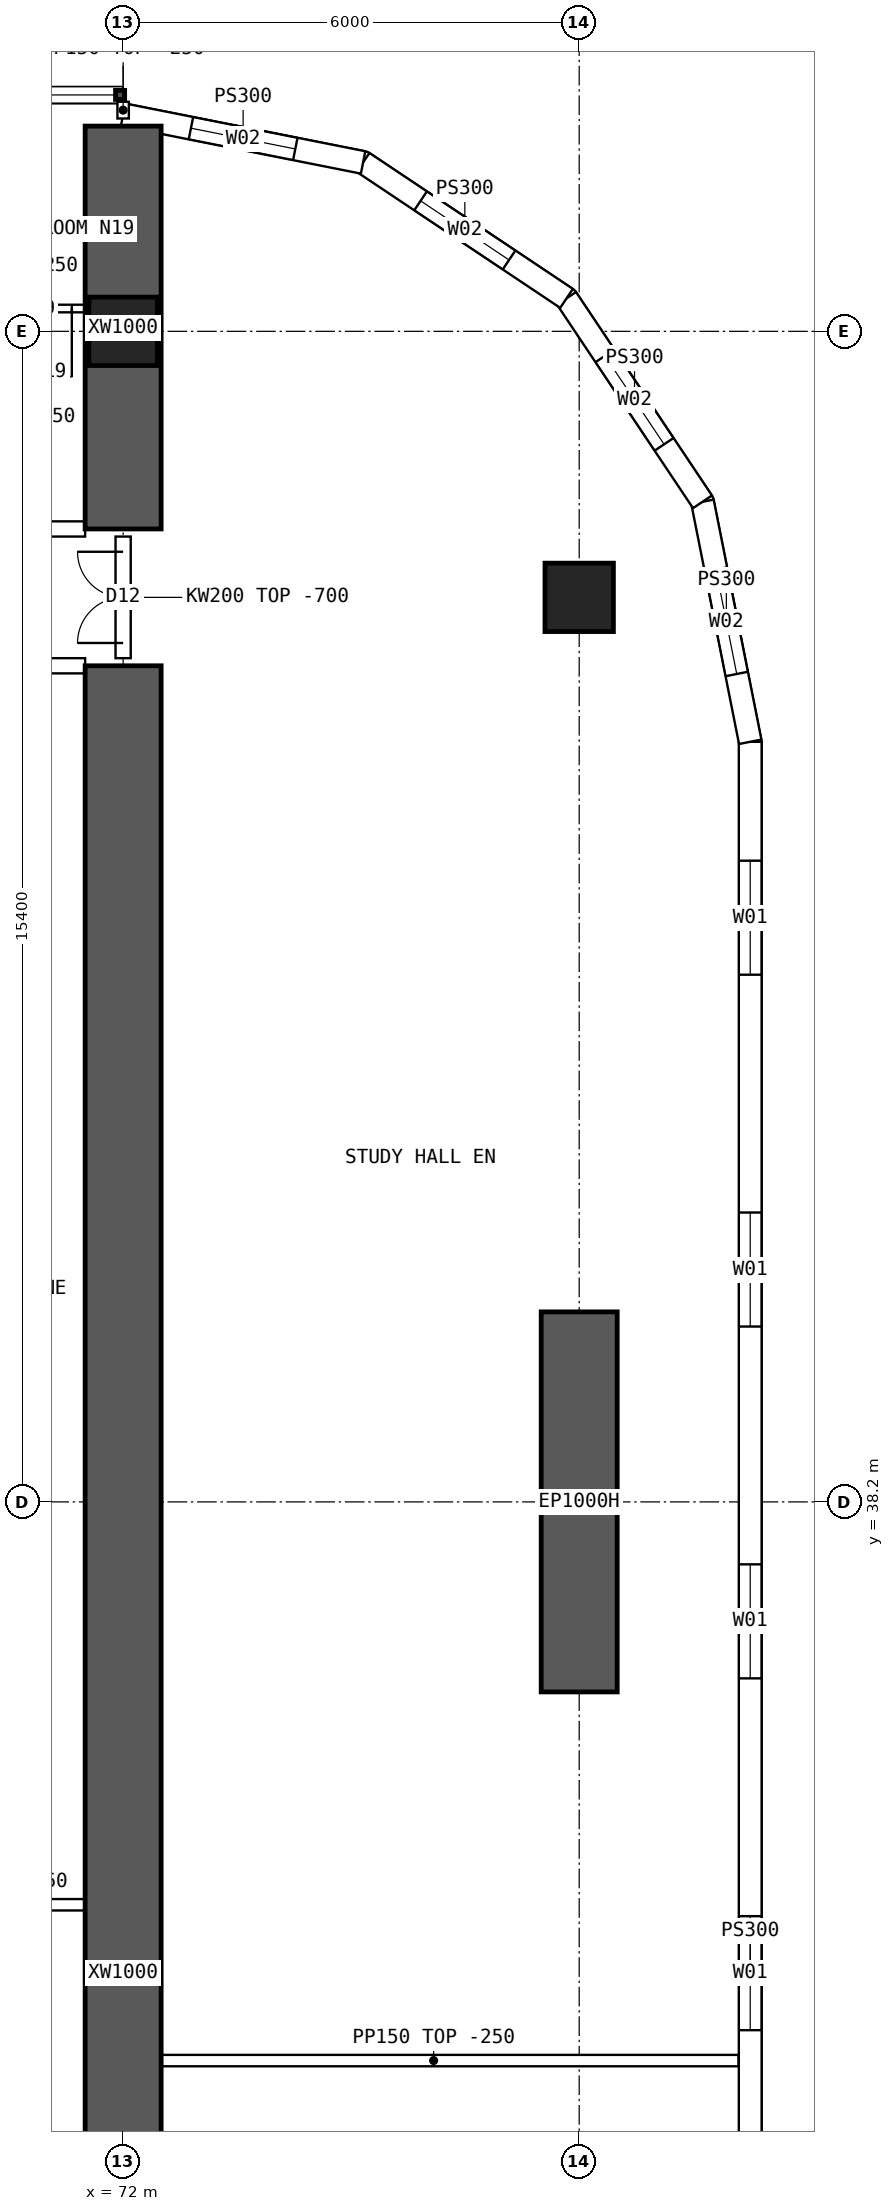
"""IFC4 building model, lengths in metres.
Left out: names, types, materials, properties, quantities, classifications, styles, units other than length and angle.
Written with IfcOpenShell. Run it as: python <this file> out.ifc"""

import sys

from ifc_helpers import new_model, si_unit, direction, frame, frame_2d, origin, origin_2d, place, context, subcontext, project, spatial, polyline, rectangle, hollow_rectangle, outline, extrude, element, fill, save


model = new_model("IFC4")
c1 = context("Model", 3, precision=1e-05, world=origin(), true_north=direction((0.0, 1.0)))
c2 = subcontext(c1, "Body", "Model", "MODEL_VIEW")
j1 = project(units=[si_unit("LENGTHUNIT", "METRE"), si_unit("PLANEANGLEUNIT", "RADIAN")], contexts=[c1])
p1 = place(None, origin())
s1 = spatial("IfcSite", under=j1, at=p1, CompositionType="ELEMENT")
p2 = place(p1, origin())
s2 = spatial("IfcBuilding", under=s1, at=p2, CompositionType="ELEMENT")
p3 = place(p2, frame((0.0, 0.0, 46.45)))
s3 = spatial("IfcBuildingStorey", under=s2, at=p3, CompositionType="ELEMENT", Elevation=46.45)
for number, where, z_axis, x_axis in (
    (1, (72.0, 53.6, 0.0), (0.0, 0.0, 1.0), (1.0, 0.0, 0.0)),
    (2, (78.0, 50.1, 0.0), (0.0, 0.0, 1.0), (1.0, 0.0, 0.0)),
):
    element("IfcColumn", number, at=place(p3, frame(where, z_axis=z_axis, x_axis=x_axis)), inside=s3, PredefinedType="COLUMN", context=c2, shape_type="SweptSolid", body=[
        extrude(hollow_rectangle(XDim=0.9, YDim=0.9, WallThickness=0.09, at=origin_2d()), origin(), (0.0, 0.0, 1.0), 3.75),
    ])
p4 = place(p3, frame((78.0, 35.7, 0.0), z_axis=(0.0, 0.0, 1.0), x_axis=(0.0, 1.0, 0.0)))
e3 = element("IfcWall", 3, at=p4, inside=s3, PredefinedType="SHEAR", context=c2, shape_type="SweptSolid", body=[
    extrude(rectangle(XDim=5.0, YDim=1.0, at=frame_2d((2.5, 0.0))), origin(), (0.0, 0.0, 1.0), 3.75),
])
p5 = place(p3, frame((72.0, 51.0, 0.0), z_axis=(0.0, 0.0, 1.0), x_axis=(0.0, 1.0, 0.0)))
e4 = element("IfcWall", 4, at=p5, inside=s3, PredefinedType="SHEAR", context=c2, shape_type="SweptSolid", body=[
    extrude(rectangle(XDim=5.3, YDim=1.0, at=frame_2d((2.65, 0.0))), origin(), (0.0, 0.0, 1.0), 3.75),
])
p6 = place(p3, frame((72.0, 14.8, 0.0), z_axis=(0.0, 0.0, 1.0), x_axis=(0.0, 1.0, 0.0)))
e5 = element("IfcWall", 5, at=p6, inside=s3, PredefinedType="SHEAR", context=c2, shape_type="SweptSolid", body=[
    extrude(rectangle(XDim=34.4, YDim=1.0, at=frame_2d((17.2, 0.0))), origin(), (0.0, 0.0, 1.0), 3.75),
])
p7 = place(p3, frame((80.25, 15.8, 0.0), z_axis=(0.0, 0.0, 1.0), x_axis=(0.0, 1.0, 0.0)))
e6 = element("IfcWall", 6, at=p7, inside=s3, PredefinedType="SOLIDWALL", context=c2, shape_type="SweptSolid", body=[
    extrude(outline(polyline([(-0.015, -0.15), (32.415, -0.15), (32.385, 0.15), (0.015, 0.15), (-0.015, -0.15)])), origin(), (0.0, 0.0, 1.0), 3.5),
])
p8 = place(p7, frame((1.564, 0.0, 0.9)))
e7 = element("IfcOpeningElement", 7, at=p8, cuts=e6, PredefinedType="OPENING", context=c2, shape_type="SweptSolid", body=[
    extrude(rectangle(XDim=1.5, YDim=2.0, at=frame_2d((0.75, 1.0))), frame((0.0, 0.16, 0.0), z_axis=(0.0, -1.0, 0.0), x_axis=(1.0, 0.0, 0.0)), (0.0, 0.0, 1.0), 0.32),
])
p9 = place(p7, frame((6.193, 0.0, 0.9)))
e8 = element("IfcOpeningElement", 8, at=p9, cuts=e6, PredefinedType="OPENING", context=c2, shape_type="SweptSolid", body=[
    extrude(rectangle(XDim=1.5, YDim=2.0, at=frame_2d((0.75, 1.0))), frame((0.0, 0.16, 0.0), z_axis=(0.0, -1.0, 0.0), x_axis=(1.0, 0.0, 0.0)), (0.0, 0.0, 1.0), 0.32),
])
p10 = place(p7, frame((10.822, 0.0, 0.9)))
e9 = element("IfcOpeningElement", 9, at=p10, cuts=e6, PredefinedType="OPENING", context=c2, shape_type="SweptSolid", body=[
    extrude(rectangle(XDim=1.5, YDim=2.0, at=frame_2d((0.75, 1.0))), frame((0.0, 0.16, 0.0), z_axis=(0.0, -1.0, 0.0), x_axis=(1.0, 0.0, 0.0)), (0.0, 0.0, 1.0), 0.32),
])
p11 = place(p7, frame((15.45, 0.0, 0.9)))
e10 = element("IfcOpeningElement", 10, at=p11, cuts=e6, PredefinedType="OPENING", context=c2, shape_type="SweptSolid", body=[
    extrude(rectangle(XDim=1.5, YDim=2.0, at=frame_2d((0.75, 1.0))), frame((0.0, 0.16, 0.0), z_axis=(0.0, -1.0, 0.0), x_axis=(1.0, 0.0, 0.0)), (0.0, 0.0, 1.0), 0.32),
])
p12 = place(p7, frame((20.079, 0.0, 0.9)))
e11 = element("IfcOpeningElement", 11, at=p12, cuts=e6, PredefinedType="OPENING", context=c2, shape_type="SweptSolid", body=[
    extrude(rectangle(XDim=1.5, YDim=2.0, at=frame_2d((0.75, 1.0))), frame((0.0, 0.16, 0.0), z_axis=(0.0, -1.0, 0.0), x_axis=(1.0, 0.0, 0.0)), (0.0, 0.0, 1.0), 0.32),
])
p13 = place(p7, frame((24.707, 0.0, 0.9)))
e12 = element("IfcOpeningElement", 12, at=p13, cuts=e6, PredefinedType="OPENING", context=c2, shape_type="SweptSolid", body=[
    extrude(rectangle(XDim=1.5, YDim=2.0, at=frame_2d((0.75, 1.0))), frame((0.0, 0.16, 0.0), z_axis=(0.0, -1.0, 0.0), x_axis=(1.0, 0.0, 0.0)), (0.0, 0.0, 1.0), 0.32),
])
p14 = place(p7, frame((29.336, 0.0, 0.9)))
e13 = element("IfcOpeningElement", 13, at=p14, cuts=e6, PredefinedType="OPENING", context=c2, shape_type="SweptSolid", body=[
    extrude(rectangle(XDim=1.5, YDim=2.0, at=frame_2d((0.75, 1.0))), frame((0.0, 0.16, 0.0), z_axis=(0.0, -1.0, 0.0), x_axis=(1.0, 0.0, 0.0)), (0.0, 0.0, 1.0), 0.32),
])
p15 = place(p3, frame((80.25, 48.2, 0.0), z_axis=(0.0, 0.0, 1.0), x_axis=(-0.195065901187, 0.980790137692, 0.0)))
e14 = element("IfcWall", 14, at=p15, inside=s3, PredefinedType="SOLIDWALL", context=c2, shape_type="SweptSolid", body=[
    extrude(outline(polyline([(-0.015, -0.15), (3.249, -0.15), (3.189, 0.15), (0.015, 0.15), (-0.015, -0.15)])), origin(), (0.0, 0.0, 1.0), 3.5),
])
p16 = place(p15, frame((0.909, 0.0, 0.9)))
e15 = element("IfcOpeningElement", 15, at=p16, cuts=e14, PredefinedType="OPENING", context=c2, shape_type="SweptSolid", body=[
    extrude(rectangle(XDim=1.4, YDim=1.8, at=frame_2d((0.7, 0.9))), frame((0.0, 0.16, 0.0), z_axis=(0.0, -1.0, 0.0), x_axis=(1.0, 0.0, 0.0)), (0.0, 0.0, 1.0), 0.32),
])
p17 = place(p3, frame((79.622, 51.357, 0.0), z_axis=(0.0, 0.0, 1.0), x_axis=(-0.555609954424, 0.831443069936, 0.0)))
e16 = element("IfcWall", 16, at=p17, inside=s3, PredefinedType="SOLIDWALL", context=c2, shape_type="SweptSolid", body=[
    extrude(outline(polyline([(-0.03, -0.15), (3.249, -0.15), (3.189, 0.15), (0.03, 0.15), (-0.03, -0.15)])), origin(), (0.0, 0.0, 1.0), 3.5),
])
p18 = place(p17, frame((0.909, 0.0, 0.9)))
e17 = element("IfcOpeningElement", 17, at=p18, cuts=e16, PredefinedType="OPENING", context=c2, shape_type="SweptSolid", body=[
    extrude(rectangle(XDim=1.4, YDim=1.8, at=frame_2d((0.7, 0.9))), frame((0.0, 0.16, 0.0), z_axis=(0.0, -1.0, 0.0), x_axis=(1.0, 0.0, 0.0)), (0.0, 0.0, 1.0), 0.32),
])
p19 = place(p3, frame((77.833, 54.034, 0.0), z_axis=(0.0, 0.0, 1.0), x_axis=(-0.831478105043, 0.555557522525, 0.0)))
e18 = element("IfcWall", 18, at=p19, inside=s3, PredefinedType="SOLIDWALL", context=c2, shape_type="SweptSolid", body=[
    extrude(outline(polyline([(-0.03, -0.15), (3.249, -0.15), (3.189, 0.15), (0.03, 0.15), (-0.03, -0.15)])), origin(), (0.0, 0.0, 1.0), 3.5),
])
p20 = place(p19, frame((0.909, 0.0, 0.9)))
e19 = element("IfcOpeningElement", 19, at=p20, cuts=e18, PredefinedType="OPENING", context=c2, shape_type="SweptSolid", body=[
    extrude(rectangle(XDim=1.4, YDim=1.8, at=frame_2d((0.7, 0.9))), frame((0.0, 0.16, 0.0), z_axis=(0.0, -1.0, 0.0), x_axis=(1.0, 0.0, 0.0)), (0.0, 0.0, 1.0), 0.32),
])
p21 = place(p3, frame((75.157, 55.822, 0.0), z_axis=(0.0, 0.0, 1.0), x_axis=(-0.980787251524, 0.195080412259, 0.0)))
e20 = element("IfcWall", 20, at=p21, inside=s3, PredefinedType="SOLIDWALL", context=c2, shape_type="SweptSolid", body=[
    extrude(outline(polyline([(-0.03, -0.15), (3.249, -0.15), (3.189, 0.15), (0.03, 0.15), (-0.03, -0.15)])), origin(), (0.0, 0.0, 1.0), 3.5),
])
p22 = place(p21, frame((0.909, 0.0, 0.9)))
e21 = element("IfcOpeningElement", 21, at=p22, cuts=e20, PredefinedType="OPENING", context=c2, shape_type="SweptSolid", body=[
    extrude(rectangle(XDim=1.4, YDim=1.8, at=frame_2d((0.7, 0.9))), frame((0.0, 0.16, 0.0), z_axis=(0.0, -1.0, 0.0), x_axis=(1.0, 0.0, 0.0)), (0.0, 0.0, 1.0), 0.32),
])
p23 = place(p3, frame((66.5, 51.0, 0.0), z_axis=(0.0, 0.0, 1.0), x_axis=(1.0, 0.0, 0.0)))
e22 = element("IfcWall", 22, at=p23, inside=s3, PredefinedType="SOLIDWALL", context=c2, shape_type="SweptSolid", body=[
    extrude(outline(polyline([(0.0, 0.0), (5.0, 0.0), (5.0, 3.1), (0.0, 3.1), (0.0, 0.0)])), frame((0.0, 0.1, 0.0), z_axis=(0.0, -1.0, 0.0), x_axis=(1.0, 0.0, 0.0)), (0.0, 0.0, 1.0), 0.2),
])
p24 = place(p23, frame((1.3, 0.0, 0.0)))
e23 = element("IfcOpeningElement", 23, at=p24, cuts=e22, PredefinedType="OPENING", context=c2, shape_type="SweptSolid", body=[
    extrude(rectangle(XDim=0.9, YDim=2.1, at=frame_2d((0.45, 1.05))), frame((0.0, 0.11, 0.0), z_axis=(0.0, -1.0, 0.0), x_axis=(1.0, 0.0, 0.0)), (0.0, 0.0, 1.0), 0.22),
])
p25 = place(p23, frame((2.675, 0.0, 0.0)))
e24 = element("IfcOpeningElement", 24, at=p25, cuts=e22, PredefinedType="OPENING", context=c2, shape_type="SweptSolid", body=[
    extrude(rectangle(XDim=0.9, YDim=2.1, at=frame_2d((0.45, 1.05))), frame((0.0, 0.11, 0.0), z_axis=(0.0, -1.0, 0.0), x_axis=(1.0, 0.0, 0.0)), (0.0, 0.0, 1.0), 0.22),
])
p26 = place(p3, frame((66.5, 49.2, 0.0), z_axis=(0.0, 0.0, 1.0), x_axis=(1.0, 0.0, 0.0)))
e25 = element("IfcWall", 25, at=p26, inside=s3, PredefinedType="SOLIDWALL", context=c2, shape_type="SweptSolid", body=[
    extrude(rectangle(XDim=5.0, YDim=0.2, at=frame_2d((2.5, 0.0))), origin(), (0.0, 0.0, 1.0), 3.5),
])
p27 = place(p26, frame((0.2, 0.0, 0.0)))
e26 = element("IfcOpeningElement", 26, at=p27, cuts=e25, PredefinedType="OPENING", context=c2, shape_type="SweptSolid", body=[
    extrude(rectangle(XDim=1.6, YDim=2.1, at=frame_2d((0.8, 1.05))), frame((0.0, 0.11, 0.0), z_axis=(0.0, -1.0, 0.0), x_axis=(1.0, 0.0, 0.0)), (0.0, 0.0, 1.0), 0.22),
])
p28 = place(p3, frame((70.25, 53.9, 0.0), z_axis=(0.0, 0.0, 1.0), x_axis=(1.0, 0.0, 0.0)))
e27 = element("IfcWall", 27, at=p28, inside=s3, PredefinedType="PARTITIONING", context=c2, shape_type="SweptSolid", body=[
    extrude(rectangle(XDim=1.3, YDim=0.1, at=frame_2d((0.65, 0.0))), origin(), (0.0, 0.0, 1.0), 3.5),
])
p29 = place(p28, frame((0.175, 0.0, 0.0)))
e28 = element("IfcOpeningElement", 28, at=p29, cuts=e27, PredefinedType="OPENING", context=c2, shape_type="SweptSolid", body=[
    extrude(rectangle(XDim=0.9, YDim=2.1, at=frame_2d((0.45, 1.05))), frame((0.0, 0.06, 0.0), z_axis=(0.0, -1.0, 0.0), x_axis=(1.0, 0.0, 0.0)), (0.0, 0.0, 1.0), 0.12),
])
p30 = place(p3, frame((68.4, 32.9, 0.0), z_axis=(0.0, 0.0, 1.0), x_axis=(1.0, 0.0, 0.0)))
e29 = element("IfcWall", 29, at=p30, inside=s3, PredefinedType="PARTITIONING", context=c2, shape_type="SweptSolid", body=[
    extrude(rectangle(XDim=3.6, YDim=0.15, at=frame_2d((1.8, 0.0))), origin(), (0.0, 0.0, 1.0), 3.5),
])
p31 = place(p3, frame((72.075, 30.85, 0.0), z_axis=(0.0, 0.0, 1.0), x_axis=(1.0, 0.0, 0.0)))
e30 = element("IfcWall", 30, at=p31, inside=s3, PredefinedType="PARTITIONING", context=c2, shape_type="SweptSolid", body=[
    extrude(outline(polyline([(0.0, 0.0), (8.02, 0.0), (8.02, 3.5), (6.227, 3.5), (6.225, 3.05), (5.627, 3.05), (5.625, 3.5), (0.0, 3.5), (0.0, 0.0)])), frame((0.0, 0.075, 0.0), z_axis=(0.0, -1.0, 0.0), x_axis=(1.0, 0.0, 0.0)), (0.0, 0.0, 1.0), 0.15),
])
p32 = place(p3, frame((72.0, 49.3, 0.0), z_axis=(0.0, 0.0, 1.0), x_axis=(0.0, 1.0, 0.0)))
e31 = element("IfcWall", 31, at=p32, inside=s3, PredefinedType="SOLIDWALL", context=c2, shape_type="SweptSolid", body=[
    extrude(outline(polyline([(0.0, 0.0), (1.6, 0.0), (1.6, 3.05), (0.0, 3.05), (0.0, 0.0)])), frame((0.0, 0.1, 0.0), z_axis=(0.0, -1.0, 0.0), x_axis=(1.0, 0.0, 0.0)), (0.0, 0.0, 1.0), 0.2),
])
p33 = place(p32, frame((0.2, 0.0, 0.0)))
e32 = element("IfcOpeningElement", 32, at=p33, cuts=e31, PredefinedType="OPENING", context=c2, shape_type="SweptSolid", body=[
    extrude(rectangle(XDim=1.2, YDim=2.1, at=frame_2d((0.6, 1.05))), frame((0.0, 0.11, 0.0), z_axis=(0.0, -1.0, 0.0), x_axis=(1.0, 0.0, 0.0)), (0.0, 0.0, 1.0), 0.22),
])
p34 = place(p3, frame((72.0, 56.4, 0.0), z_axis=(0.0, 0.0, 1.0), x_axis=(0.0, 1.0, 0.0)))
e33 = element("IfcWall", 33, at=p34, inside=s3, PredefinedType="PARTITIONING", context=c2, shape_type="SweptSolid", body=[
    extrude(rectangle(XDim=0.22, YDim=0.15, at=frame_2d((0.11, 0.0))), origin(), (0.0, 0.0, 1.0), 3.5),
])
p35 = place(p11, origin())
e34 = element("IfcWindow", 34, at=p35, inside=s3, PartitioningType="SINGLE_PANEL", PredefinedType="WINDOW", context=c2, shape_type="SweptSolid", body=[
    extrude(rectangle(XDim=1.5, YDim=2.0, at=frame_2d((0.75, 1.0))), frame((0.0, 0.03, 0.0), z_axis=(0.0, -1.0, 0.0), x_axis=(1.0, 0.0, 0.0)), (0.0, 0.0, 1.0), 0.06),
])
fill(e10, e34)
p36 = place(p12, origin())
e35 = element("IfcWindow", 35, at=p36, inside=s3, PartitioningType="SINGLE_PANEL", PredefinedType="WINDOW", context=c2, shape_type="SweptSolid", body=[
    extrude(rectangle(XDim=1.5, YDim=2.0, at=frame_2d((0.75, 1.0))), frame((0.0, 0.03, 0.0), z_axis=(0.0, -1.0, 0.0), x_axis=(1.0, 0.0, 0.0)), (0.0, 0.0, 1.0), 0.06),
])
fill(e11, e35)
p37 = place(p13, origin())
e36 = element("IfcWindow", 36, at=p37, inside=s3, PartitioningType="SINGLE_PANEL", PredefinedType="WINDOW", context=c2, shape_type="SweptSolid", body=[
    extrude(rectangle(XDim=1.5, YDim=2.0, at=frame_2d((0.75, 1.0))), frame((0.0, 0.03, 0.0), z_axis=(0.0, -1.0, 0.0), x_axis=(1.0, 0.0, 0.0)), (0.0, 0.0, 1.0), 0.06),
])
fill(e12, e36)
p38 = place(p14, origin())
e37 = element("IfcWindow", 37, at=p38, inside=s3, PartitioningType="SINGLE_PANEL", PredefinedType="WINDOW", context=c2, shape_type="SweptSolid", body=[
    extrude(rectangle(XDim=1.5, YDim=2.0, at=frame_2d((0.75, 1.0))), frame((0.0, 0.03, 0.0), z_axis=(0.0, -1.0, 0.0), x_axis=(1.0, 0.0, 0.0)), (0.0, 0.0, 1.0), 0.06),
])
fill(e13, e37)
p39 = place(p16, origin())
e38 = element("IfcWindow", 38, at=p39, inside=s3, PartitioningType="SINGLE_PANEL", PredefinedType="WINDOW", context=c2, shape_type="SweptSolid", body=[
    extrude(rectangle(XDim=1.4, YDim=1.8, at=frame_2d((0.7, 0.9))), frame((0.0, 0.03, 0.0), z_axis=(0.0, -1.0, 0.0), x_axis=(1.0, 0.0, 0.0)), (0.0, 0.0, 1.0), 0.06),
])
fill(e15, e38)
p40 = place(p18, origin())
e39 = element("IfcWindow", 39, at=p40, inside=s3, PartitioningType="SINGLE_PANEL", PredefinedType="WINDOW", context=c2, shape_type="SweptSolid", body=[
    extrude(rectangle(XDim=1.4, YDim=1.8, at=frame_2d((0.7, 0.9))), frame((0.0, 0.03, 0.0), z_axis=(0.0, -1.0, 0.0), x_axis=(1.0, 0.0, 0.0)), (0.0, 0.0, 1.0), 0.06),
])
fill(e17, e39)
p41 = place(p20, origin())
e40 = element("IfcWindow", 40, at=p41, inside=s3, PartitioningType="SINGLE_PANEL", PredefinedType="WINDOW", context=c2, shape_type="SweptSolid", body=[
    extrude(rectangle(XDim=1.4, YDim=1.8, at=frame_2d((0.7, 0.9))), frame((0.0, 0.03, 0.0), z_axis=(0.0, -1.0, 0.0), x_axis=(1.0, 0.0, 0.0)), (0.0, 0.0, 1.0), 0.06),
])
fill(e19, e40)
p42 = place(p22, origin())
e41 = element("IfcWindow", 41, at=p42, inside=s3, PartitioningType="SINGLE_PANEL", PredefinedType="WINDOW", context=c2, shape_type="SweptSolid", body=[
    extrude(rectangle(XDim=1.4, YDim=1.8, at=frame_2d((0.7, 0.9))), frame((0.0, 0.03, 0.0), z_axis=(0.0, -1.0, 0.0), x_axis=(1.0, 0.0, 0.0)), (0.0, 0.0, 1.0), 0.06),
])
fill(e21, e41)
p43 = place(p29, origin())
e42 = element("IfcDoor", 42, at=p43, inside=s3, OperationType="SINGLE_SWING_RIGHT", PredefinedType="DOOR", context=c2, shape_type="SweptSolid", body=[
    extrude(rectangle(XDim=0.9, YDim=2.1, at=frame_2d((0.45, 1.05))), frame((0.0, 0.025, 0.0), z_axis=(0.0, -1.0, 0.0), x_axis=(1.0, 0.0, 0.0)), (0.0, 0.0, 1.0), 0.05),
])
fill(e28, e42)
p44 = place(p33, origin())
e43 = element("IfcDoor", 43, at=p44, inside=s3, OperationType="DOUBLE_DOOR_SINGLE_SWING", PredefinedType="DOOR", context=c2, shape_type="SweptSolid", body=[
    extrude(rectangle(XDim=1.2, YDim=2.1, at=frame_2d((0.6, 1.05))), frame((0.0, 0.025, 0.0), z_axis=(0.0, -1.0, 0.0), x_axis=(1.0, 0.0, 0.0)), (0.0, 0.0, 1.0), 0.05),
])
fill(e32, e43)
save(model, sys.argv[1])
